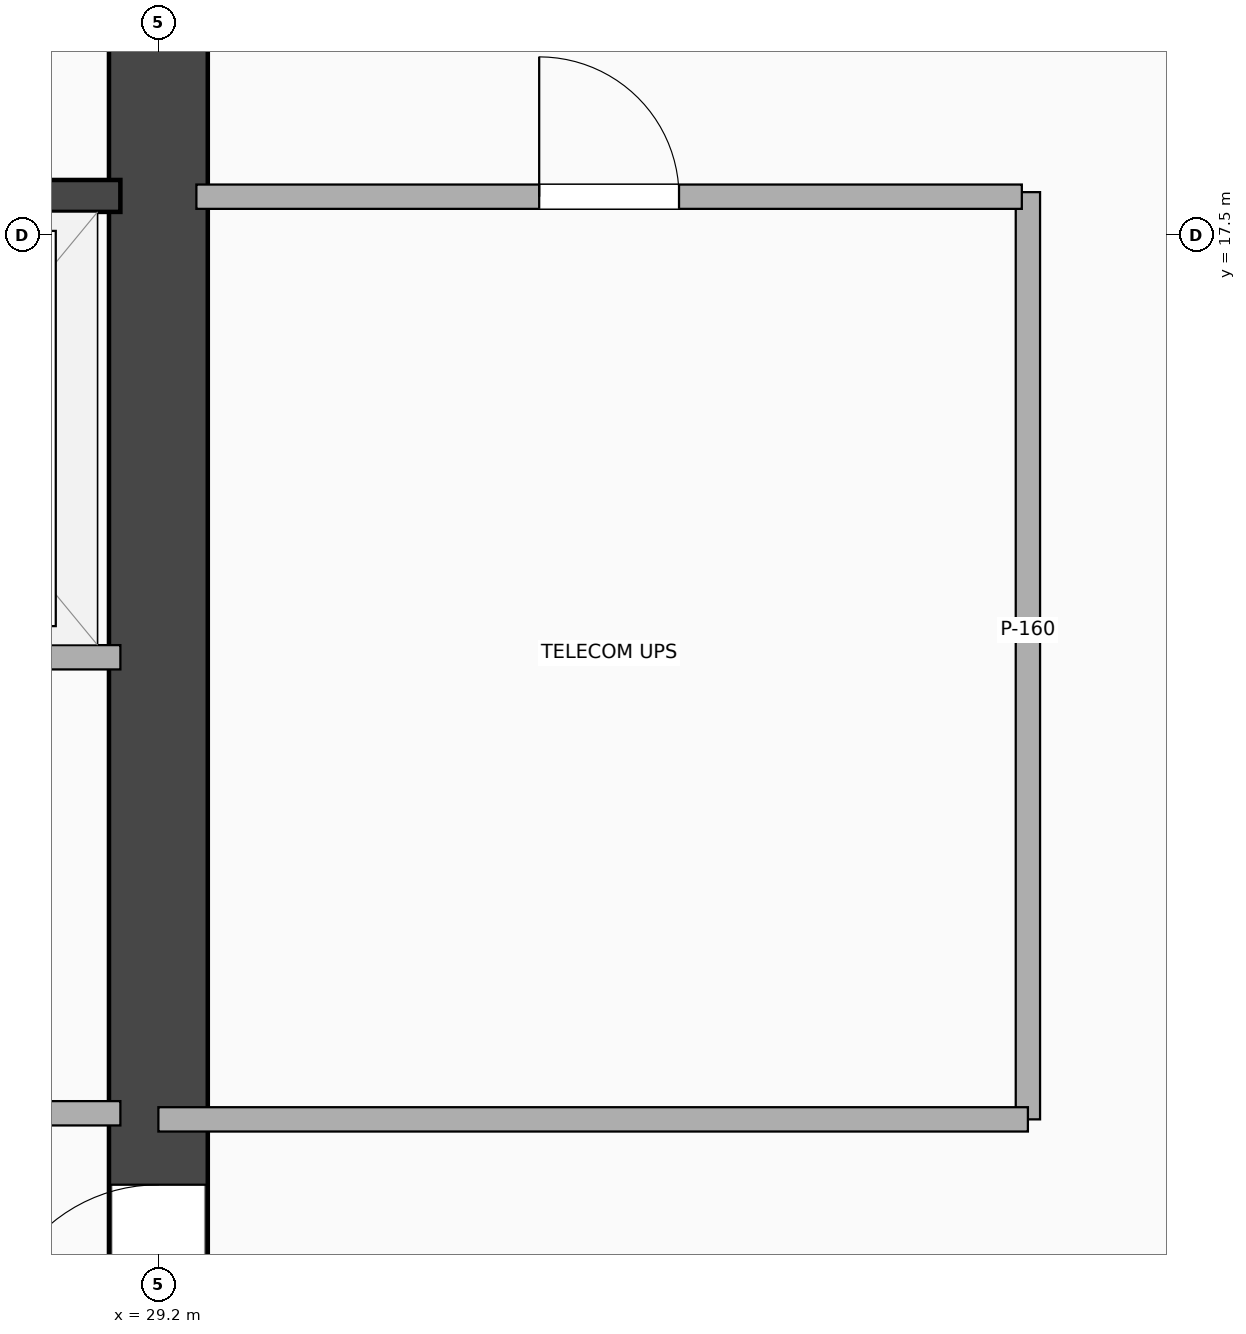
"""IFC4 building model, lengths in metres.
Left out: names, types, materials, properties, quantities, classifications, styles, units other than length and angle.
Written with IfcOpenShell. Run it as: python <this file> out.ifc"""

import sys

from ifc_helpers import new_model, si_unit, direction, frame, frame_2d, origin, place, context, subcontext, project, spatial, rectangle, extrude, element, fill, save


model = new_model("IFC4")
c1 = context("Model", 3, precision=1e-05, world=origin(), true_north=direction((0.0, 1.0)))
c2 = subcontext(c1, "Body", "Model", "MODEL_VIEW")
j1 = project(units=[si_unit("LENGTHUNIT", "METRE"), si_unit("PLANEANGLEUNIT", "RADIAN")], contexts=[c1])
p1 = place(None, origin())
s1 = spatial("IfcSite", under=j1, at=p1, CompositionType="ELEMENT")
p2 = place(p1, origin())
s2 = spatial("IfcBuilding", under=s1, at=p2, CompositionType="ELEMENT")
p3 = place(p2, frame((0.0, 0.0, -5.4)))
s3 = spatial("IfcBuildingStorey", under=s2, at=p3, CompositionType="ELEMENT", Elevation=-5.4)
p4 = place(p3, frame((29.2, 3.5, 0.0), z_axis=(0.0, 0.0, 1.0), x_axis=(0.0, 1.0, 0.0)))
e1 = element("IfcWall", 1, at=p4, inside=s3, PredefinedType="SHEAR", context=c2, shape_type="SweptSolid", body=[
    extrude(rectangle(XDim=16.9, YDim=0.65, at=frame_2d((8.45, 0.0))), origin(), (0.0, 0.0, 1.0), 5.05),
])
p5 = place(p4, frame((7.75, 0.0, 0.0), z_axis=(0.0, 0.0, 1.0), x_axis=(-1.0, 0.0, 0.0)))
e2 = element("IfcOpeningElement", 2, at=p5, cuts=e1, PredefinedType="OPENING", context=c2, shape_type="SweptSolid", body=[
    extrude(rectangle(XDim=1.1, YDim=2.15, at=frame_2d((0.55, 1.075))), frame((0.0, 0.335, 0.0), z_axis=(0.0, -1.0, 0.0), x_axis=(1.0, 0.0, 0.0)), (0.0, 0.0, 1.0), 0.67),
])
p6 = place(p3, frame((20.65, 17.755, 0.0), z_axis=(0.0, 0.0, 1.0), x_axis=(1.0, 0.0, 0.0)))
e3 = element("IfcWall", 3, at=p6, inside=s3, PredefinedType="SHEAR", context=c2, shape_type="SweptSolid", body=[
    extrude(rectangle(XDim=8.3, YDim=0.21, at=frame_2d((4.15, 0.0))), origin(), (0.0, 0.0, 1.0), 5.05),
])
p7 = place(p6, frame((2.2, 0.0, 0.0), z_axis=(0.0, 0.0, 1.0), x_axis=(-1.0, 0.0, 0.0)))
e4 = element("IfcOpeningElement", 4, at=p7, cuts=e3, PredefinedType="OPENING", context=c2, shape_type="SweptSolid", body=[
    extrude(rectangle(XDim=1.05, YDim=2.15, at=frame_2d((0.525, 1.075))), frame((0.0, 0.115, 0.0), z_axis=(0.0, -1.0, 0.0), x_axis=(1.0, 0.0, 0.0)), (0.0, 0.0, 1.0), 0.23),
])
p8 = place(p6, frame((4.15, 0.0, 0.0)))
e5 = element("IfcOpeningElement", 5, at=p8, cuts=e3, PredefinedType="OPENING", context=c2, shape_type="SweptSolid", body=[
    extrude(rectangle(XDim=1.1, YDim=2.18, at=frame_2d((0.55, 1.09))), frame((0.0, 0.115, 0.0), z_axis=(0.0, -1.0, 0.0), x_axis=(1.0, 0.0, 0.0)), (0.0, 0.0, 1.0), 0.23),
])
p9 = place(p6, frame((6.45, 0.0, 0.0)))
e6 = element("IfcOpeningElement", 6, at=p9, cuts=e3, PredefinedType="OPENING", context=c2, shape_type="SweptSolid", body=[
    extrude(rectangle(XDim=1.12, YDim=2.2, at=frame_2d((0.56, 1.1))), frame((0.0, 0.115, 0.0), z_axis=(0.0, -1.0, 0.0), x_axis=(1.0, 0.0, 0.0)), (0.0, 0.0, 1.0), 0.23),
])
p10 = place(p3, frame((24.22, 14.72, 0.0), z_axis=(0.0, 0.0, 1.0), x_axis=(1.0, 0.0, 0.0)))
e7 = element("IfcWall", 7, at=p10, inside=s3, PredefinedType="PARTITIONING", context=c2, shape_type="SweptSolid", body=[
    extrude(rectangle(XDim=4.73, YDim=0.16, at=frame_2d((2.365, 0.0))), origin(), (0.0, 0.0, 1.0), 4.18),
])
p11 = place(p3, frame((24.22, 11.72, 0.0), z_axis=(0.0, 0.0, 1.0), x_axis=(1.0, 0.0, 0.0)))
e8 = element("IfcWall", 8, at=p11, inside=s3, PredefinedType="PARTITIONING", context=c2, shape_type="SweptSolid", body=[
    extrude(rectangle(XDim=4.73, YDim=0.16, at=frame_2d((2.365, 0.0))), origin(), (0.0, 0.0, 1.0), 4.18),
])
p12 = place(p11, frame((1.905, 0.0, 0.0)))
e9 = element("IfcOpeningElement", 9, at=p12, cuts=e8, PredefinedType="OPENING", context=c2, shape_type="SweptSolid", body=[
    extrude(rectangle(XDim=0.92, YDim=2.08, at=frame_2d((0.46, 1.04))), frame((0.0, 0.09, 0.0), z_axis=(0.0, -1.0, 0.0), x_axis=(1.0, 0.0, 0.0)), (0.0, 0.0, 1.0), 0.18),
])
p13 = place(p3, frame((34.92, 11.68, 0.0), z_axis=(0.0, 0.0, 1.0), x_axis=(0.0, 1.0, 0.0)))
e10 = element("IfcWall", 10, at=p13, inside=s3, PredefinedType="PARTITIONING", context=c2, shape_type="SweptSolid", body=[
    extrude(rectangle(XDim=6.1, YDim=0.16, at=frame_2d((3.05, 0.0))), origin(), (0.0, 0.0, 1.0), 5.05),
])
p14 = place(p3, frame((29.2, 11.68, 0.0), z_axis=(0.0, 0.0, 1.0), x_axis=(1.0, 0.0, 0.0)))
e11 = element("IfcWall", 11, at=p14, inside=s3, PredefinedType="PARTITIONING", context=c2, shape_type="SweptSolid", body=[
    extrude(rectangle(XDim=5.72, YDim=0.16, at=frame_2d((2.86, 0.0))), origin(), (0.0, 0.0, 1.0), 4.18),
])
p15 = place(p3, frame((29.45, 17.75, 0.0), z_axis=(0.0, 0.0, 1.0), x_axis=(1.0, 0.0, 0.0)))
e12 = element("IfcWall", 12, at=p15, inside=s3, PredefinedType="PARTITIONING", context=c2, shape_type="SweptSolid", body=[
    extrude(rectangle(XDim=5.43, YDim=0.16, at=frame_2d((2.715, 0.0))), origin(), (0.0, 0.0, 1.0), 4.18),
])
p16 = place(p15, frame((3.175, 0.0, 0.0), z_axis=(0.0, 0.0, 1.0), x_axis=(-1.0, 0.0, 0.0)))
e13 = element("IfcOpeningElement", 13, at=p16, cuts=e12, PredefinedType="OPENING", context=c2, shape_type="SweptSolid", body=[
    extrude(rectangle(XDim=0.92, YDim=2.08, at=frame_2d((0.46, 1.04))), frame((0.0, 0.09, 0.0), z_axis=(0.0, -1.0, 0.0), x_axis=(1.0, 0.0, 0.0)), (0.0, 0.0, 1.0), 0.18),
])
p17 = place(p5, origin())
e14 = element("IfcDoor", 14, at=p17, inside=s3, OperationType="SINGLE_SWING_LEFT", PredefinedType="DOOR", context=c2, shape_type="SweptSolid", body=[
    extrude(rectangle(XDim=1.1, YDim=2.15, at=frame_2d((0.55, 1.075))), frame((0.0, 0.025, 0.0), z_axis=(0.0, -1.0, 0.0), x_axis=(1.0, 0.0, 0.0)), (0.0, 0.0, 1.0), 0.05),
])
fill(e2, e14)
p18 = place(p16, origin())
e15 = element("IfcDoor", 15, at=p18, inside=s3, OperationType="SINGLE_SWING_LEFT", PredefinedType="DOOR", context=c2, shape_type="SweptSolid", body=[
    extrude(rectangle(XDim=0.92, YDim=2.08, at=frame_2d((0.46, 1.04))), frame((0.0, 0.025, 0.0), z_axis=(0.0, -1.0, 0.0), x_axis=(1.0, 0.0, 0.0)), (0.0, 0.0, 1.0), 0.05),
])
fill(e13, e15)
save(model, sys.argv[1])
